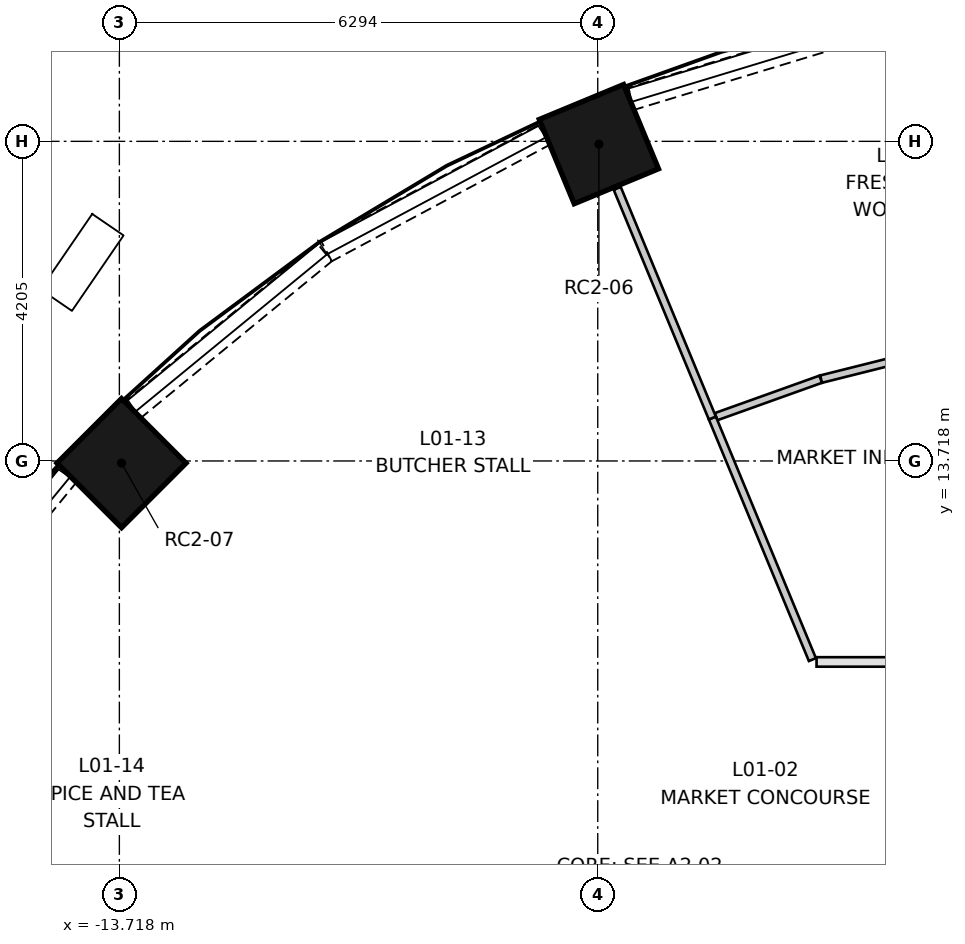
"""IFC4 building model, lengths in metres.
Left out: names, types, materials, properties, quantities, classifications, styles, units other than length and angle.
Written with IfcOpenShell. Run it as: python <this file> out.ifc"""

import sys

from ifc_helpers import new_model, si_unit, direction, frame, frame_2d, origin, origin_2d, place, context, subcontext, project, spatial, rectangle, extrude, element, save


model = new_model("IFC4")
c1 = context("Model", 3, precision=1e-05, world=origin(), true_north=direction((0.0, 1.0)))
c2 = subcontext(c1, "Body", "Model", "MODEL_VIEW")
j1 = project(units=[si_unit("LENGTHUNIT", "METRE"), si_unit("PLANEANGLEUNIT", "RADIAN")], contexts=[c1])
p1 = place(None, origin())
s1 = spatial("IfcSite", under=j1, at=p1, CompositionType="ELEMENT")
p2 = place(p1, origin())
s2 = spatial("IfcBuilding", under=s1, at=p2, CompositionType="ELEMENT")
p3 = place(p2, frame((0.0, 0.0, 5.2)))
s3 = spatial("IfcBuildingStorey", under=s2, at=p3, CompositionType="ELEMENT", Elevation=5.2)
for number, where, z_axis, x_axis in (
    (1, (-7.409, 17.886, 0.0), (0.0, 0.0, 1.0), (-0.383, 0.924, 0.0)),
    (2, (-13.69, 13.69, 0.0), (0.0, 0.0, 1.0), (-0.707, 0.707, 0.0)),
):
    element("IfcColumn", number, at=place(p3, frame(where, z_axis=z_axis, x_axis=x_axis)), inside=s3, PredefinedType="COLUMN", context=c2, shape_type="SweptSolid", body=[
        extrude(rectangle(XDim=1.2, YDim=1.2, at=origin_2d()), origin(), (0.0, 0.0, 1.0), 4.7),
    ])
p4 = place(p3, frame((-3.878, 19.425, 0.0), z_axis=(0.0, 0.0, 1.0), x_axis=(-0.956935334366, -0.290301164038, 0.0)))
e3 = element("IfcWall", 3, at=p4, inside=s3, PredefinedType="SOLIDWALL", context=c2, shape_type="SweptSolid", body=[
    extrude(rectangle(XDim=3.252, YDim=0.3, at=frame_2d((1.626, 0.0))), origin(), (0.0, 0.0, 1.0), 0.45),
])
p5 = place(p3, frame((-8.124, 18.011, 0.0), z_axis=(0.0, 0.0, 1.0), x_axis=(-0.881968250723, -0.471308820961, 0.0)))
e4 = element("IfcWall", 4, at=p5, inside=s3, PredefinedType="SOLIDWALL", context=c2, shape_type="SweptSolid", body=[
    extrude(rectangle(XDim=3.252, YDim=0.3, at=frame_2d((1.626, 0.0))), origin(), (0.0, 0.0, 1.0), 0.45),
])
for number, where, z_axis, x_axis in (
    (5, (-11.018, 16.461, 0.0), (0.0, 0.0, 1.0), (-0.773, -0.634, 0.0)),
    (6, (-14.399, 13.531, 0.0), (0.0, 0.0, 1.0), (-0.634, -0.773, 0.0)),
):
    element("IfcWall", number, at=place(p3, frame(where, z_axis=z_axis, x_axis=x_axis)), inside=s3, PredefinedType="SOLIDWALL", context=c2, shape_type="SweptSolid", body=[
        extrude(rectangle(XDim=3.251, YDim=0.3, at=frame_2d((1.626, 0.0))), origin(), (0.0, 0.0, 1.0), 0.45),
    ])
p6 = place(p3, frame((-4.545, 11.074, 0.0), z_axis=(0.0, 0.0, 1.0), x_axis=(1.0, 0.0, 0.0)))
e7 = element("IfcWall", 7, at=p6, inside=s3, PredefinedType="PARTITIONING", context=c2, shape_type="SweptSolid", body=[
    extrude(rectangle(XDim=4.545, YDim=0.125, at=frame_2d((2.272, 0.0))), origin(), (0.0, 0.0, 1.0), 4.3),
])
p7 = place(p6, frame((1.8, 0.0, 0.0)))
e8 = element("IfcOpeningElement", 8, at=p7, cuts=e7, PredefinedType="OPENING", context=c2, shape_type="SweptSolid", body=[
    extrude(rectangle(XDim=1.0, YDim=2.1, at=frame_2d((0.5, 1.05))), frame((0.0, 0.073, 0.0), z_axis=(0.0, -1.0, 0.0), x_axis=(1.0, 0.0, 0.0)), (0.0, 0.0, 1.0), 0.145),
])
p8 = place(p3, frame((-5.867, 14.301, 0.0), z_axis=(0.0, 0.0, 1.0), x_axis=(0.941545350251, 0.336886261845, 0.0)))
e9 = element("IfcWall", 9, at=p8, inside=s3, PredefinedType="PARTITIONING", context=c2, shape_type="SweptSolid", body=[
    extrude(rectangle(XDim=1.462, YDim=0.1, at=frame_2d((0.731, 0.0))), origin(), (0.0, 0.0, 1.0), 4.3),
])
p9 = place(p3, frame((-4.485, 14.795, 0.0), z_axis=(0.0, 0.0, 1.0), x_axis=(0.970028424003, 0.242991474388, 0.0)))
e10 = element("IfcWall", 10, at=p9, inside=s3, PredefinedType="PARTITIONING", context=c2, shape_type="SweptSolid", body=[
    extrude(rectangle(XDim=1.512, YDim=0.1, at=frame_2d((0.756, 0.0))), origin(), (0.0, 0.0, 1.0), 4.3),
])
p10 = place(p3, frame((-4.6, 11.105, 0.0), z_axis=(0.0, 0.0, 1.0), x_axis=(-0.382669369174, 0.92388535755, 0.0)))
e11 = element("IfcWall", 11, at=p10, inside=s3, PredefinedType="PARTITIONING", context=c2, shape_type="SweptSolid", body=[
    extrude(rectangle(XDim=3.44, YDim=0.1, at=frame_2d((1.72, 0.0))), origin(), (0.0, 0.0, 1.0), 4.3),
])
p11 = place(p3, frame((-5.916, 14.283, 0.0), z_axis=(0.0, 0.0, 1.0), x_axis=(-0.382716658507, 0.923865769093, 0.0)))
e12 = element("IfcWall", 12, at=p11, inside=s3, PredefinedType="PARTITIONING", context=c2, shape_type="SweptSolid", body=[
    extrude(rectangle(XDim=3.27, YDim=0.1, at=frame_2d((1.635, 0.0))), origin(), (0.0, 0.0, 1.0), 4.3),
])
save(model, sys.argv[1])
